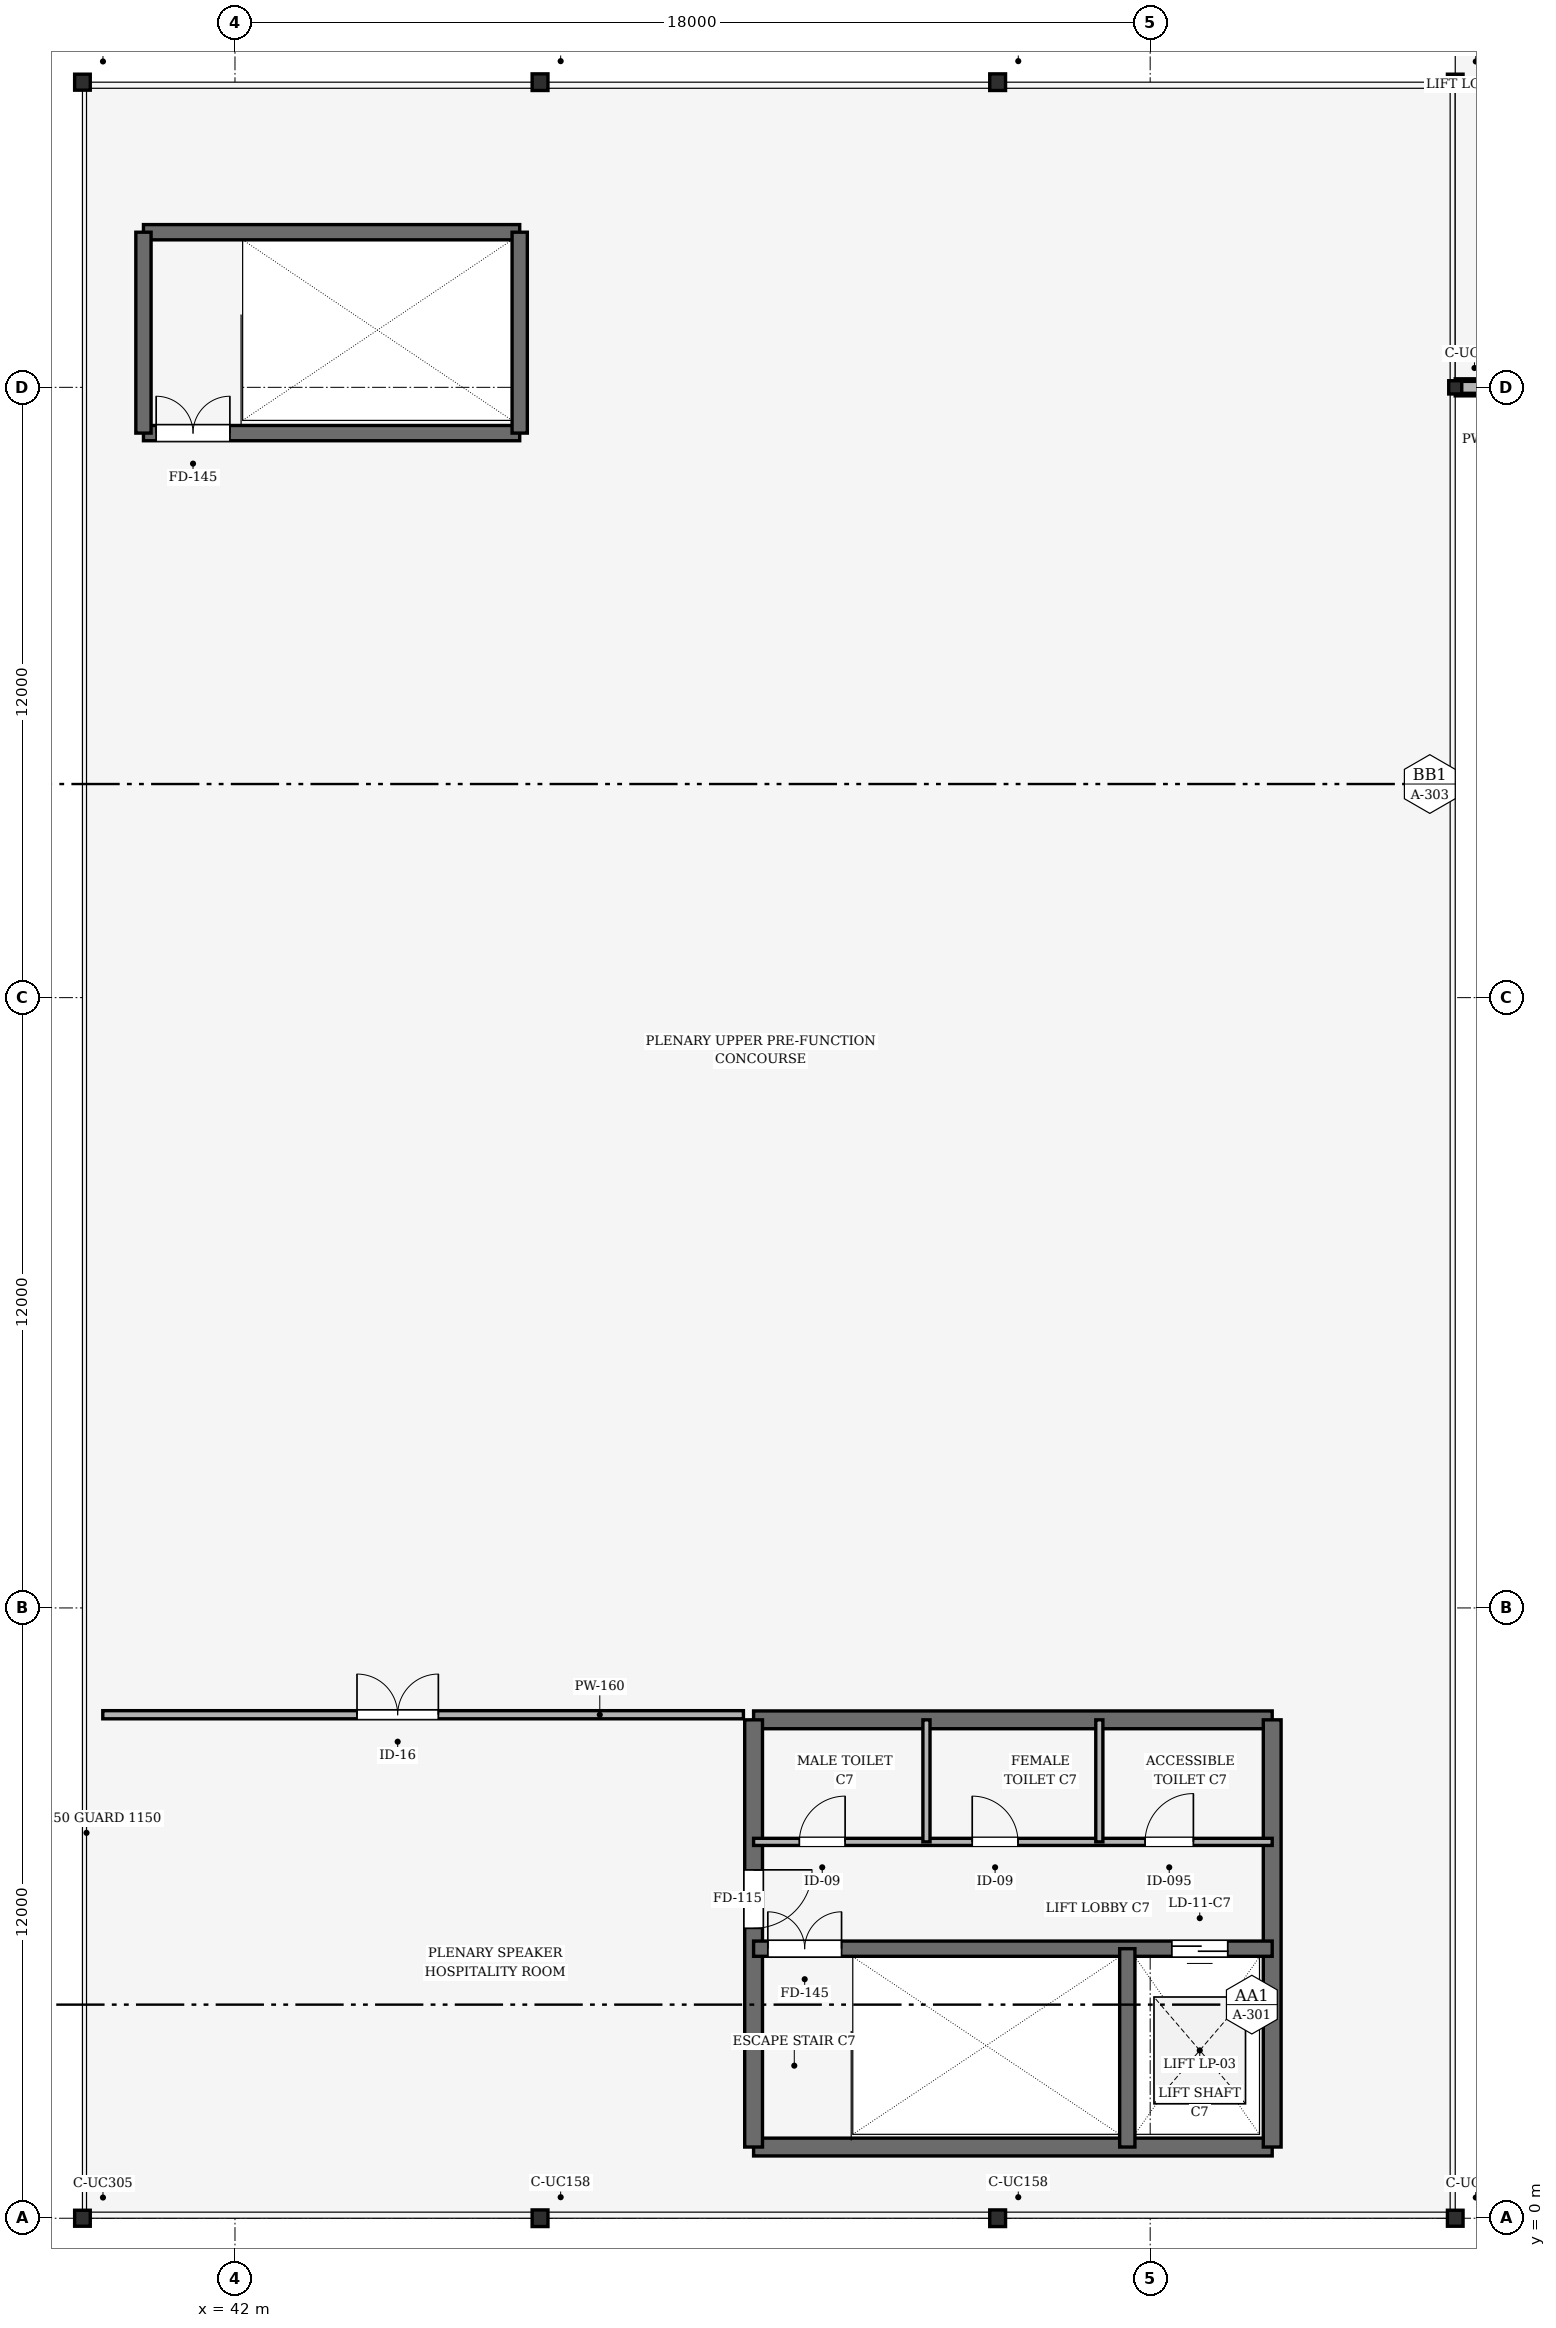
"""IFC4 building model, lengths in metres.
Left out: names, types, materials, properties, quantities, classifications, styles, units other than length and angle.
Written with IfcOpenShell. Run it as: python <this file> out.ifc"""

import sys

from ifc_helpers import new_model, si_unit, direction, frame, frame_2d, origin, origin_2d, place, context, subcontext, project, spatial, rectangle, i_section, extrude, element, fill, save


model = new_model("IFC4")
c1 = context("Model", 3, precision=1e-05, world=origin(), true_north=direction((0.0, 1.0)))
c2 = subcontext(c1, "Body", "Model", "MODEL_VIEW")
j1 = project(units=[si_unit("LENGTHUNIT", "METRE"), si_unit("PLANEANGLEUNIT", "RADIAN")], contexts=[c1])
p1 = place(None, origin())
s1 = spatial("IfcSite", under=j1, at=p1, CompositionType="ELEMENT")
p2 = place(p1, origin())
s2 = spatial("IfcBuilding", under=s1, at=p2, CompositionType="ELEMENT")
p3 = place(p2, frame((0.0, 0.0, 10.8)))
s3 = spatial("IfcBuildingStorey", under=s2, at=p3, CompositionType="ELEMENT", Elevation=10.8)
for number, where, z_axis, x_axis in (
    (1, (39.0, 0.0, 0.0), (0.0, 0.0, 1.0), (1.0, 0.0, 0.0)),
    (2, (39.0, 42.0, 0.0), (0.0, 0.0, 1.0), (1.0, 0.0, 0.0)),
):
    element("IfcColumn", number, at=place(p3, frame(where, z_axis=z_axis, x_axis=x_axis)), inside=s3, PredefinedType="COLUMN", context=c2, shape_type="SweptSolid", body=[
        extrude(i_section(OverallWidth=0.307, OverallDepth=0.314, WebThickness=0.012, FlangeThickness=0.019, FilletRadius=0.015, at=origin_2d()), origin(), (0.0, 0.0, 1.0), 0.9),
    ])
for number, where, z_axis, x_axis in (
    (3, (48.0, 0.0, 0.0), (0.0, 0.0, 1.0), (1.0, 0.0, 0.0)),
    (4, (48.0, 42.0, 0.0), (0.0, 0.0, 1.0), (1.0, 0.0, 0.0)),
    (5, (57.0, 0.0, 0.0), (0.0, 0.0, 1.0), (1.0, 0.0, 0.0)),
    (6, (57.0, 42.0, 0.0), (0.0, 0.0, 1.0), (1.0, 0.0, 0.0)),
):
    element("IfcColumn", number, at=place(p3, frame(where, z_axis=z_axis, x_axis=x_axis)), inside=s3, PredefinedType="COLUMN", context=c2, shape_type="SweptSolid", body=[
        extrude(i_section(OverallWidth=0.311, OverallDepth=0.327, WebThickness=0.016, FlangeThickness=0.025, FilletRadius=0.015, at=origin_2d()), origin(), (0.0, 0.0, 1.0), 0.9),
    ])
for number, where, z_axis, x_axis in (
    (7, (66.0, 0.0, 0.0), (0.0, 0.0, 1.0), (1.0, 0.0, 0.0)),
    (8, (66.0, 42.0, 0.0), (0.0, 0.0, 1.0), (1.0, 0.0, 0.0)),
):
    element("IfcColumn", number, at=place(p3, frame(where, z_axis=z_axis, x_axis=x_axis)), inside=s3, PredefinedType="COLUMN", context=c2, shape_type="SweptSolid", body=[
        extrude(i_section(OverallWidth=0.307, OverallDepth=0.314, WebThickness=0.012, FlangeThickness=0.019, FilletRadius=0.015, at=origin_2d()), origin(), (0.0, 0.0, 1.0), 0.9),
    ])
p4 = place(p3, frame((66.0, 36.0, 0.0), z_axis=(0.0, 0.0, 1.0), x_axis=(1.0, 0.0, 0.0)))
e9 = element("IfcColumn", 9, at=p4, inside=s3, PredefinedType="COLUMN", context=c2, shape_type="SweptSolid", body=[
    extrude(i_section(OverallWidth=0.256, OverallDepth=0.26, WebThickness=0.01, FlangeThickness=0.017, FilletRadius=0.013, at=origin_2d()), origin(), (0.0, 0.0, 1.0), 4.8),
])
p5 = place(p2, frame((0.0, 0.0, 21.7)))
s4 = spatial("IfcBuildingStorey", under=s2, at=p5, CompositionType="ELEMENT", Elevation=21.7)
for number, where, z_axis, x_axis in (
    (10, (48.0, 0.0, -10.0), (0.0, 0.0, 1.0), (1.0, 0.0, 0.0)),
    (11, (48.0, 42.0, -10.0), (0.0, 0.0, 1.0), (1.0, 0.0, 0.0)),
):
    element("IfcColumn", number, at=place(p5, frame(where, z_axis=z_axis, x_axis=x_axis)), inside=s4, PredefinedType="COLUMN", context=c2, shape_type="SweptSolid", body=[
        extrude(i_section(OverallWidth=0.371, OverallDepth=0.362, WebThickness=0.012, FlangeThickness=0.021, FilletRadius=0.015, at=origin_2d()), origin(), (0.0, 0.0, 1.0), 1.229),
    ])
for number, where, z_axis, x_axis in (
    (12, (57.0, 0.0, -10.0), (0.0, 0.0, 1.0), (1.0, 0.0, 0.0)),
    (13, (57.0, 42.0, -10.0), (0.0, 0.0, 1.0), (1.0, 0.0, 0.0)),
):
    element("IfcColumn", number, at=place(p5, frame(where, z_axis=z_axis, x_axis=x_axis)), inside=s4, PredefinedType="COLUMN", context=c2, shape_type="SweptSolid", body=[
        extrude(i_section(OverallWidth=0.373, OverallDepth=0.368, WebThickness=0.014, FlangeThickness=0.024, FilletRadius=0.015, at=origin_2d()), origin(), (0.0, 0.0, 1.0), 4.101),
    ])
for number, where, z_axis, x_axis in (
    (14, (66.0, 0.0, -10.0), (0.0, 0.0, 1.0), (1.0, 0.0, 0.0)),
    (15, (66.0, 42.0, -10.0), (0.0, 0.0, 1.0), (1.0, 0.0, 0.0)),
):
    element("IfcColumn", number, at=place(p5, frame(where, z_axis=z_axis, x_axis=x_axis)), inside=s4, PredefinedType="COLUMN", context=c2, shape_type="SweptSolid", body=[
        extrude(i_section(OverallWidth=0.395, OverallDepth=0.381, WebThickness=0.018, FlangeThickness=0.03, FilletRadius=0.015, at=origin_2d()), origin(), (0.0, 0.0, 1.0), 9.0),
    ])
p6 = place(p3, frame((66.0, 36.0, 0.0), z_axis=(0.0, 0.0, 1.0), x_axis=(1.0, 0.0, 0.0)))
e16 = element("IfcWall", 16, at=p6, inside=s3, PredefinedType="SOLIDWALL", context=c2, shape_type="SweptSolid", body=[
    extrude(rectangle(XDim=48.0, YDim=0.335, at=frame_2d((24.0, 0.0))), origin(), (0.0, 0.0, 1.0), 4.3),
])
p7 = place(p3, frame((66.0, 36.0, 5.01), z_axis=(0.0, 0.0, 1.0), x_axis=(1.0, 0.0, 0.0)))
e17 = element("IfcWall", 17, at=p7, inside=s3, PredefinedType="PARAPET", context=c2, shape_type="SweptSolid", body=[
    extrude(rectangle(XDim=48.0, YDim=0.235, at=frame_2d((24.0, 0.0))), origin(), (0.0, 0.0, 1.0), 1.14),
])
for number, where, z_axis, x_axis in (
    (18, (52.2, 1.4, 0.0), (0.0, 0.0, 1.0), (1.0, 0.0, 0.0)),
    (19, (62.4, 9.8, 0.0), (0.0, 0.0, 1.0), (-1.0, 0.0, 0.0)),
):
    element("IfcWall", number, at=place(p3, frame(where, z_axis=z_axis, x_axis=x_axis)), inside=s3, PredefinedType="SHEAR", context=c2, shape_type="SweptSolid", body=[
        extrude(rectangle(XDim=10.2, YDim=0.35, at=frame_2d((5.1, 0.0))), origin(), (0.0, 0.0, 1.0), 5.4),
    ])
p8 = place(p3, frame((52.2, 9.8, 0.0), z_axis=(0.0, 0.0, 1.0), x_axis=(0.0, -1.0, 0.0)))
e20 = element("IfcWall", 20, at=p8, inside=s3, PredefinedType="SHEAR", context=c2, shape_type="SweptSolid", body=[
    extrude(rectangle(XDim=8.4, YDim=0.35, at=frame_2d((4.2, 0.0))), origin(), (0.0, 0.0, 1.0), 5.4),
])
p9 = place(p8, frame((2.95, 0.0, 0.0)))
e21 = element("IfcOpeningElement", 21, at=p9, cuts=e20, PredefinedType="OPENING", context=c2, shape_type="SweptSolid", body=[
    extrude(rectangle(XDim=1.15, YDim=2.15, at=frame_2d((0.575, 1.075))), frame((0.0, 0.185, 0.0), z_axis=(0.0, -1.0, 0.0), x_axis=(1.0, 0.0, 0.0)), (0.0, 0.0, 1.0), 0.37),
])
p10 = place(p3, frame((62.4, 1.4, 0.0), z_axis=(0.0, 0.0, 1.0), x_axis=(0.0, 1.0, 0.0)))
e22 = element("IfcWall", 22, at=p10, inside=s3, PredefinedType="SHEAR", context=c2, shape_type="SweptSolid", body=[
    extrude(rectangle(XDim=8.4, YDim=0.35, at=frame_2d((4.2, 0.0))), origin(), (0.0, 0.0, 1.0), 5.4),
])
p11 = place(p3, frame((52.2, 5.3, 0.0), z_axis=(0.0, 0.0, 1.0), x_axis=(1.0, 0.0, 0.0)))
e23 = element("IfcWall", 23, at=p11, inside=s3, PredefinedType="SHEAR", context=c2, shape_type="SweptSolid", body=[
    extrude(rectangle(XDim=10.2, YDim=0.3, at=frame_2d((5.1, 0.0))), origin(), (0.0, 0.0, 1.0), 5.4),
])
p12 = place(p11, frame((0.28, 0.0, 0.0)))
e24 = element("IfcOpeningElement", 24, at=p12, cuts=e23, PredefinedType="OPENING", context=c2, shape_type="SweptSolid", body=[
    extrude(rectangle(XDim=1.45, YDim=2.15, at=frame_2d((0.725, 1.075))), frame((0.0, 0.16, 0.0), z_axis=(0.0, -1.0, 0.0), x_axis=(1.0, 0.0, 0.0)), (0.0, 0.0, 1.0), 0.32),
])
p13 = place(p11, frame((8.225, 0.0, 0.0)))
e25 = element("IfcOpeningElement", 25, at=p13, cuts=e23, PredefinedType="OPENING", context=c2, shape_type="SweptSolid", body=[
    extrude(rectangle(XDim=1.1, YDim=2.15, at=frame_2d((0.55, 1.075))), frame((0.0, 0.16, 0.0), z_axis=(0.0, -1.0, 0.0), x_axis=(1.0, 0.0, 0.0)), (0.0, 0.0, 1.0), 0.32),
])
p14 = place(p3, frame((59.55, 1.4, 0.0), z_axis=(0.0, 0.0, 1.0), x_axis=(0.0, 1.0, 0.0)))
e26 = element("IfcWall", 26, at=p14, inside=s3, PredefinedType="SHEAR", context=c2, shape_type="SweptSolid", body=[
    extrude(rectangle(XDim=3.9, YDim=0.3, at=frame_2d((1.95, 0.0))), origin(), (0.0, 0.0, 1.0), 5.4),
])
p15 = place(p3, frame((52.2, 7.4, 0.0), z_axis=(0.0, 0.0, 1.0), x_axis=(1.0, 0.0, 0.0)))
e27 = element("IfcWall", 27, at=p15, inside=s3, PredefinedType="PARTITIONING", context=c2, shape_type="SweptSolid", body=[
    extrude(rectangle(XDim=10.2, YDim=0.14, at=frame_2d((5.1, 0.0))), origin(), (0.0, 0.0, 1.0), 4.5),
])
p16 = place(p15, frame((0.9, 0.0, 0.0)))
e28 = element("IfcOpeningElement", 28, at=p16, cuts=e27, PredefinedType="OPENING", context=c2, shape_type="SweptSolid", body=[
    extrude(rectangle(XDim=0.9, YDim=2.1, at=frame_2d((0.45, 1.05))), frame((0.0, 0.08, 0.0), z_axis=(0.0, -1.0, 0.0), x_axis=(1.0, 0.0, 0.0)), (0.0, 0.0, 1.0), 0.16),
])
p17 = place(p15, frame((4.3, 0.0, 0.0)))
e29 = element("IfcOpeningElement", 29, at=p17, cuts=e27, PredefinedType="OPENING", context=c2, shape_type="SweptSolid", body=[
    extrude(rectangle(XDim=0.9, YDim=2.1, at=frame_2d((0.45, 1.05))), frame((0.0, 0.08, 0.0), z_axis=(0.0, -1.0, 0.0), x_axis=(1.0, 0.0, 0.0)), (0.0, 0.0, 1.0), 0.16),
])
p18 = place(p15, frame((7.7, 0.0, 0.0)))
e30 = element("IfcOpeningElement", 30, at=p18, cuts=e27, PredefinedType="OPENING", context=c2, shape_type="SweptSolid", body=[
    extrude(rectangle(XDim=0.95, YDim=2.1, at=frame_2d((0.475, 1.05))), frame((0.0, 0.08, 0.0), z_axis=(0.0, -1.0, 0.0), x_axis=(1.0, 0.0, 0.0)), (0.0, 0.0, 1.0), 0.16),
])
for number, where, z_axis, x_axis in (
    (31, (55.6, 7.4, 0.0), (0.0, 0.0, 1.0), (0.0, 1.0, 0.0)),
    (32, (59.0, 7.4, 0.0), (0.0, 0.0, 1.0), (0.0, 1.0, 0.0)),
):
    element("IfcWall", number, at=place(p3, frame(where, z_axis=z_axis, x_axis=x_axis)), inside=s3, PredefinedType="PARTITIONING", context=c2, shape_type="SweptSolid", body=[
        extrude(rectangle(XDim=2.4, YDim=0.14, at=frame_2d((1.2, 0.0))), origin(), (0.0, 0.0, 1.0), 4.5),
    ])
p19 = place(p3, frame((40.2, 35.1, 0.0), z_axis=(0.0, 0.0, 1.0), x_axis=(1.0, 0.0, 0.0)))
e33 = element("IfcWall", 33, at=p19, inside=s3, PredefinedType="SHEAR", context=c2, shape_type="SweptSolid", body=[
    extrude(rectangle(XDim=7.4, YDim=0.3, at=frame_2d((3.7, 0.0))), origin(), (0.0, 0.0, 1.0), 5.4),
])
p20 = place(p19, frame((0.25, 0.0, 0.0)))
e34 = element("IfcOpeningElement", 34, at=p20, cuts=e33, PredefinedType="OPENING", context=c2, shape_type="SweptSolid", body=[
    extrude(rectangle(XDim=1.45, YDim=2.15, at=frame_2d((0.725, 1.075))), frame((0.0, 0.16, 0.0), z_axis=(0.0, -1.0, 0.0), x_axis=(1.0, 0.0, 0.0)), (0.0, 0.0, 1.0), 0.32),
])
p21 = place(p3, frame((47.6, 39.05, 0.0), z_axis=(0.0, 0.0, 1.0), x_axis=(-1.0, 0.0, 0.0)))
e35 = element("IfcWall", 35, at=p21, inside=s3, PredefinedType="SHEAR", context=c2, shape_type="SweptSolid", body=[
    extrude(rectangle(XDim=7.4, YDim=0.3, at=frame_2d((3.7, 0.0))), origin(), (0.0, 0.0, 1.0), 5.4),
])
for number, where, z_axis, x_axis in (
    (36, (40.2, 39.05, 0.0), (0.0, 0.0, 1.0), (0.0, -1.0, 0.0)),
    (37, (47.6, 35.1, 0.0), (0.0, 0.0, 1.0), (0.0, 1.0, 0.0)),
):
    element("IfcWall", number, at=place(p3, frame(where, z_axis=z_axis, x_axis=x_axis)), inside=s3, PredefinedType="SHEAR", context=c2, shape_type="SweptSolid", body=[
        extrude(rectangle(XDim=3.95, YDim=0.3, at=frame_2d((1.975, 0.0))), origin(), (0.0, 0.0, 1.0), 5.4),
    ])
p22 = place(p3, frame((39.4, 9.9, 0.0), z_axis=(0.0, 0.0, 1.0), x_axis=(1.0, 0.0, 0.0)))
e38 = element("IfcWall", 38, at=p22, inside=s3, PredefinedType="PARTITIONING", context=c2, shape_type="SweptSolid", body=[
    extrude(rectangle(XDim=12.6, YDim=0.16, at=frame_2d((6.3, 0.0))), origin(), (0.0, 0.0, 1.0), 2.5),
])
p23 = place(p22, frame((5.0, 0.0, 0.0)))
e39 = element("IfcOpeningElement", 39, at=p23, cuts=e38, PredefinedType="OPENING", context=c2, shape_type="SweptSolid", body=[
    extrude(rectangle(XDim=1.6, YDim=2.2, at=frame_2d((0.8, 1.1))), frame((0.0, 0.09, 0.0), z_axis=(0.0, -1.0, 0.0), x_axis=(1.0, 0.0, 0.0)), (0.0, 0.0, 1.0), 0.18),
])
p24 = place(p9, origin())
e40 = element("IfcDoor", 40, at=p24, inside=s3, OperationType="SINGLE_SWING_LEFT", PredefinedType="DOOR", context=c2, shape_type="SweptSolid", body=[
    extrude(rectangle(XDim=1.15, YDim=2.15, at=frame_2d((0.575, 1.075))), frame((0.0, 0.025, 0.0), z_axis=(0.0, -1.0, 0.0), x_axis=(1.0, 0.0, 0.0)), (0.0, 0.0, 1.0), 0.05),
])
fill(e21, e40)
p25 = place(p12, origin())
e41 = element("IfcDoor", 41, at=p25, inside=s3, OperationType="DOUBLE_DOOR_SINGLE_SWING", PredefinedType="DOOR", context=c2, shape_type="SweptSolid", body=[
    extrude(rectangle(XDim=1.45, YDim=2.15, at=frame_2d((0.725, 1.075))), frame((0.0, 0.025, 0.0), z_axis=(0.0, -1.0, 0.0), x_axis=(1.0, 0.0, 0.0)), (0.0, 0.0, 1.0), 0.05),
])
fill(e24, e41)
p26 = place(p13, origin())
e42 = element("IfcDoor", 42, at=p26, inside=s3, OperationType="DOUBLE_DOOR_SLIDING", PredefinedType="DOOR", context=c2, shape_type="SweptSolid", body=[
    extrude(rectangle(XDim=1.1, YDim=2.15, at=frame_2d((0.55, 1.075))), frame((0.0, 0.025, 0.0), z_axis=(0.0, -1.0, 0.0), x_axis=(1.0, 0.0, 0.0)), (0.0, 0.0, 1.0), 0.05),
])
fill(e25, e42)
p27 = place(p16, origin())
e43 = element("IfcDoor", 43, at=p27, inside=s3, OperationType="SINGLE_SWING_RIGHT", PredefinedType="DOOR", context=c2, shape_type="SweptSolid", body=[
    extrude(rectangle(XDim=0.9, YDim=2.1, at=frame_2d((0.45, 1.05))), frame((0.0, 0.025, 0.0), z_axis=(0.0, -1.0, 0.0), x_axis=(1.0, 0.0, 0.0)), (0.0, 0.0, 1.0), 0.05),
])
fill(e28, e43)
p28 = place(p17, origin())
e44 = element("IfcDoor", 44, at=p28, inside=s3, OperationType="SINGLE_SWING_LEFT", PredefinedType="DOOR", context=c2, shape_type="SweptSolid", body=[
    extrude(rectangle(XDim=0.9, YDim=2.1, at=frame_2d((0.45, 1.05))), frame((0.0, 0.025, 0.0), z_axis=(0.0, -1.0, 0.0), x_axis=(1.0, 0.0, 0.0)), (0.0, 0.0, 1.0), 0.05),
])
fill(e29, e44)
p29 = place(p18, origin())
e45 = element("IfcDoor", 45, at=p29, inside=s3, OperationType="SINGLE_SWING_RIGHT", PredefinedType="DOOR", context=c2, shape_type="SweptSolid", body=[
    extrude(rectangle(XDim=0.95, YDim=2.1, at=frame_2d((0.475, 1.05))), frame((0.0, 0.025, 0.0), z_axis=(0.0, -1.0, 0.0), x_axis=(1.0, 0.0, 0.0)), (0.0, 0.0, 1.0), 0.05),
])
fill(e30, e45)
p30 = place(p20, origin())
e46 = element("IfcDoor", 46, at=p30, inside=s3, OperationType="DOUBLE_DOOR_SINGLE_SWING", PredefinedType="DOOR", context=c2, shape_type="SweptSolid", body=[
    extrude(rectangle(XDim=1.45, YDim=2.15, at=frame_2d((0.725, 1.075))), frame((0.0, 0.025, 0.0), z_axis=(0.0, -1.0, 0.0), x_axis=(1.0, 0.0, 0.0)), (0.0, 0.0, 1.0), 0.05),
])
fill(e34, e46)
p31 = place(p23, origin())
e47 = element("IfcDoor", 47, at=p31, inside=s3, OperationType="DOUBLE_DOOR_SINGLE_SWING", PredefinedType="DOOR", context=c2, shape_type="SweptSolid", body=[
    extrude(rectangle(XDim=1.6, YDim=2.2, at=frame_2d((0.8, 1.1))), frame((0.0, 0.025, 0.0), z_axis=(0.0, -1.0, 0.0), x_axis=(1.0, 0.0, 0.0)), (0.0, 0.0, 1.0), 0.05),
])
fill(e39, e47)
save(model, sys.argv[1])
